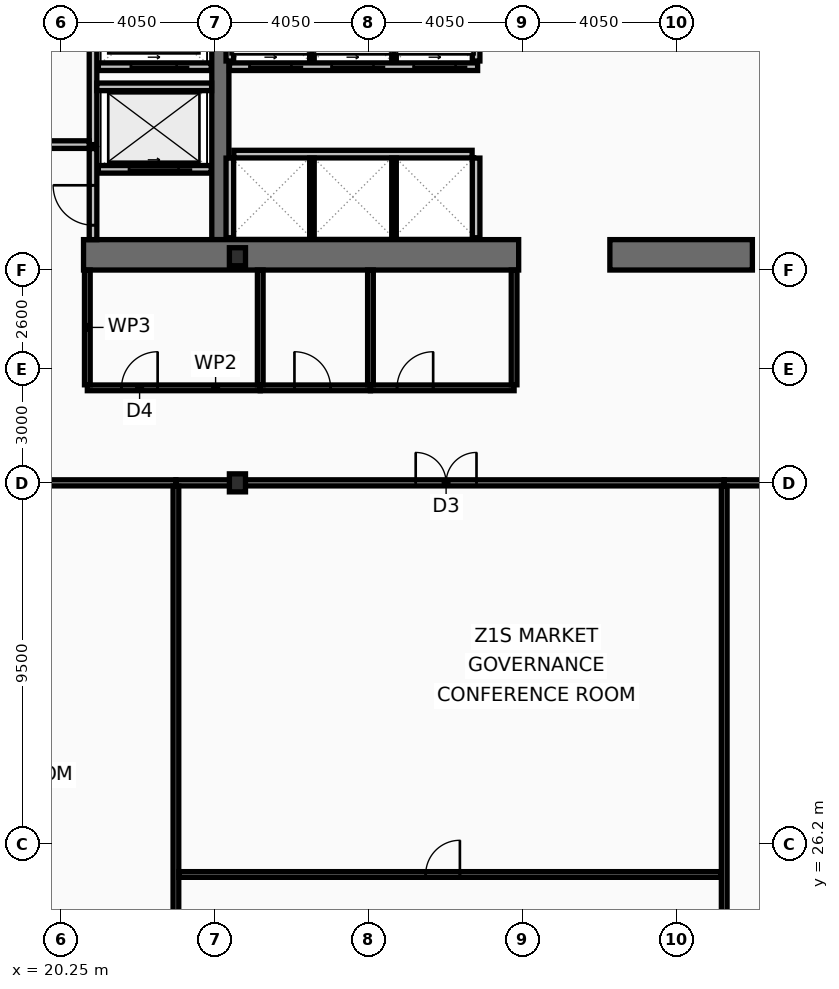
"""IFC4 building model, lengths in metres.
Left out: names, types, materials, properties, quantities, classifications, styles, units other than length and angle.
Written with IfcOpenShell. Run it as: python <this file> out.ifc"""

import sys

from ifc_helpers import new_model, si_unit, direction, frame, frame_2d, origin, origin_2d, place, context, subcontext, project, spatial, rectangle, i_section, extrude, element, fill, save


model = new_model("IFC4")
c1 = context("Model", 3, precision=1e-05, world=origin(), true_north=direction((0.0, 1.0)))
c2 = subcontext(c1, "Body", "Model", "MODEL_VIEW")
j1 = project(units=[si_unit("LENGTHUNIT", "METRE"), si_unit("PLANEANGLEUNIT", "RADIAN")], contexts=[c1])
p1 = place(None, origin())
s1 = spatial("IfcSite", under=j1, at=p1, CompositionType="ELEMENT")
p2 = place(p1, origin())
s2 = spatial("IfcBuilding", under=s1, at=p2, CompositionType="ELEMENT")
p3 = place(p2, frame((0.0, 0.0, 81.8)))
s3 = spatial("IfcBuildingStorey", under=s2, at=p3, CompositionType="ELEMENT", Elevation=81.8)
p4 = place(p3, frame((24.45, 42.1, 0.0), z_axis=(0.0, 0.0, 1.0), x_axis=(0.0, 1.0, 0.0)))
e1 = element("IfcWall", 1, at=p4, inside=s3, PredefinedType="SHEAR", context=c2, shape_type="SweptSolid", body=[
    extrude(rectangle(XDim=10.8, YDim=0.45, at=frame_2d((5.4, 0.0))), origin(), (0.0, 0.0, 1.0), 3.78),
])
p5 = place(p3, frame((32.3, 41.7, 0.0), z_axis=(0.0, 0.0, 1.0), x_axis=(-1.0, 0.0, 0.0)))
e2 = element("IfcWall", 2, at=p5, inside=s3, PredefinedType="SHEAR", context=c2, shape_type="SweptSolid", body=[
    extrude(rectangle(XDim=11.45, YDim=0.8, at=frame_2d((5.725, 0.0))), origin(), (0.0, 0.0, 1.0), 3.78),
])
p6 = place(p3, frame((38.45, 41.7, 0.0), z_axis=(0.0, 0.0, 1.0), x_axis=(-1.0, 0.0, 0.0)))
e3 = element("IfcWall", 3, at=p6, inside=s3, PredefinedType="SHEAR", context=c2, shape_type="SweptSolid", body=[
    extrude(rectangle(XDim=3.75, YDim=0.8, at=frame_2d((1.875, 0.0))), origin(), (0.0, 0.0, 1.0), 3.78),
])
for number, where, z_axis, x_axis in (
    (4, (24.9, 35.7, 0.0), (0.0, 0.0, 1.0), (1.0, 0.0, 0.0)),
    (5, (24.9, 41.65, 0.0), (0.0, 0.0, 1.0), (1.0, 0.0, 0.0)),
):
    element("IfcColumn", number, at=place(p3, frame(where, z_axis=z_axis, x_axis=x_axis)), inside=s3, PredefinedType="COLUMN", context=c2, shape_type="SweptSolid", body=[
        extrude(i_section(OverallWidth=0.424, OverallDepth=0.474, WebThickness=0.048, FlangeThickness=0.077, at=origin_2d()), origin(), (0.0, 0.0, 1.0), 4.0),
    ])
p7 = place(p3, frame((24.21, 43.95, 0.0), z_axis=(0.0, 0.0, 1.0), x_axis=(-1.0, 0.0, 0.0)))
e6 = element("IfcWall", 6, at=p7, inside=s3, PredefinedType="PARTITIONING", context=c2, shape_type="SweptSolid", body=[
    extrude(rectangle(XDim=2.97, YDim=0.2, at=frame_2d((1.485, 0.0))), origin(), (0.0, 0.0, 1.0), 3.78),
])
p8 = place(p7, frame((0.86, 0.0, 0.0)))
e7 = element("IfcOpeningElement", 7, at=p8, cuts=e6, PredefinedType="OPENING", context=c2, shape_type="SweptSolid", body=[
    extrude(rectangle(XDim=1.3, YDim=2.18, at=frame_2d((0.65, 1.09))), frame((0.0, 0.11, 0.0), z_axis=(0.0, -1.0, 0.0), x_axis=(1.0, 0.0, 0.0)), (0.0, 0.0, 1.0), 0.22),
])
p9 = place(p3, frame((24.21, 46.65, 0.0), z_axis=(0.0, 0.0, 1.0), x_axis=(-1.0, 0.0, 0.0)))
e8 = element("IfcWall", 8, at=p9, inside=s3, PredefinedType="PARTITIONING", context=c2, shape_type="SweptSolid", body=[
    extrude(rectangle(XDim=2.97, YDim=0.2, at=frame_2d((1.485, 0.0))), origin(), (0.0, 0.0, 1.0), 3.78),
])
p10 = place(p9, frame((0.91, 0.0, 0.0)))
e9 = element("IfcOpeningElement", 9, at=p10, cuts=e8, PredefinedType="OPENING", context=c2, shape_type="SweptSolid", body=[
    extrude(rectangle(XDim=1.2, YDim=2.18, at=frame_2d((0.6, 1.09))), frame((0.0, 0.11, 0.0), z_axis=(0.0, -1.0, 0.0), x_axis=(1.0, 0.0, 0.0)), (0.0, 0.0, 1.0), 0.22),
])
p11 = place(p3, frame((31.22, 46.65, 0.0), z_axis=(0.0, 0.0, 1.0), x_axis=(-1.0, 0.0, 0.0)))
e10 = element("IfcWall", 10, at=p11, inside=s3, PredefinedType="PARTITIONING", context=c2, shape_type="SweptSolid", body=[
    extrude(rectangle(XDim=6.53, YDim=0.2, at=frame_2d((3.265, 0.0))), origin(), (0.0, 0.0, 1.0), 3.78),
])
p12 = place(p11, frame((4.9, 0.0, 0.0)))
e11 = element("IfcOpeningElement", 11, at=p12, cuts=e10, PredefinedType="OPENING", context=c2, shape_type="SweptSolid", body=[
    extrude(rectangle(XDim=1.1, YDim=2.18, at=frame_2d((0.55, 1.09))), frame((0.0, 0.11, 0.0), z_axis=(0.0, -1.0, 0.0), x_axis=(1.0, 0.0, 0.0)), (0.0, 0.0, 1.0), 0.22),
])
p13 = place(p11, frame((2.74, 0.0, 0.0)))
e12 = element("IfcOpeningElement", 12, at=p13, cuts=e10, PredefinedType="OPENING", context=c2, shape_type="SweptSolid", body=[
    extrude(rectangle(XDim=1.1, YDim=2.18, at=frame_2d((0.55, 1.09))), frame((0.0, 0.11, 0.0), z_axis=(0.0, -1.0, 0.0), x_axis=(1.0, 0.0, 0.0)), (0.0, 0.0, 1.0), 0.22),
])
p14 = place(p11, frame((0.58, 0.0, 0.0)))
e13 = element("IfcOpeningElement", 13, at=p14, cuts=e10, PredefinedType="OPENING", context=c2, shape_type="SweptSolid", body=[
    extrude(rectangle(XDim=1.1, YDim=2.18, at=frame_2d((0.55, 1.09))), frame((0.0, 0.11, 0.0), z_axis=(0.0, -1.0, 0.0), x_axis=(1.0, 0.0, 0.0)), (0.0, 0.0, 1.0), 0.22),
])
p15 = place(p3, frame((21.1, 44.6, 0.0), z_axis=(0.0, 0.0, 1.0), x_axis=(0.0, 1.0, 0.0)))
e14 = element("IfcWall", 14, at=p15, inside=s3, PredefinedType="PARTITIONING", context=c2, shape_type="SweptSolid", body=[
    extrude(rectangle(XDim=4.3, YDim=0.2, at=frame_2d((2.15, 0.0))), origin(), (0.0, 0.0, 1.0), 3.78),
])
p16 = place(p3, frame((17.0, 44.6, 0.0), z_axis=(0.0, 0.0, 1.0), x_axis=(1.0, 0.0, 0.0)))
e15 = element("IfcWall", 15, at=p16, inside=s3, PredefinedType="PARTITIONING", context=c2, shape_type="SweptSolid", body=[
    extrude(rectangle(XDim=4.0, YDim=0.2, at=frame_2d((2.0, 0.0))), origin(), (0.0, 0.0, 1.0), 3.78),
])
p17 = place(p16, frame((1.25, 0.0, 0.0)))
e16 = element("IfcOpeningElement", 16, at=p17, cuts=e15, PredefinedType="OPENING", context=c2, shape_type="SweptSolid", body=[
    extrude(rectangle(XDim=1.05, YDim=2.15, at=frame_2d((0.525, 1.075))), frame((0.0, 0.11, 0.0), z_axis=(0.0, -1.0, 0.0), x_axis=(1.0, 0.0, 0.0)), (0.0, 0.0, 1.0), 0.22),
])
p18 = place(p3, frame((21.2, 46.12, 0.0), z_axis=(0.0, 0.0, 1.0), x_axis=(1.0, 0.0, 0.0)))
e17 = element("IfcWall", 17, at=p18, inside=s3, PredefinedType="PARTITIONING", context=c2, shape_type="SweptSolid", body=[
    extrude(rectangle(XDim=3.02, YDim=0.2, at=frame_2d((1.51, 0.0))), origin(), (0.0, 0.0, 1.0), 3.78),
])
p19 = place(p3, frame((21.1, 42.1, 0.0), z_axis=(0.0, 0.0, 1.0), x_axis=(0.0, 1.0, 0.0)))
e18 = element("IfcWall", 18, at=p19, inside=s3, PredefinedType="PARTITIONING", context=c2, shape_type="SweptSolid", body=[
    extrude(rectangle(XDim=2.395, YDim=0.2, at=frame_2d((1.198, 0.0))), origin(), (0.0, 0.0, 1.0), 3.78),
])
p20 = place(p19, frame((0.38, 0.0, 0.0)))
e19 = element("IfcOpeningElement", 19, at=p20, cuts=e18, PredefinedType="OPENING", context=c2, shape_type="SweptSolid", body=[
    extrude(rectangle(XDim=1.05, YDim=2.15, at=frame_2d((0.525, 1.075))), frame((0.0, 0.11, 0.0), z_axis=(0.0, -1.0, 0.0), x_axis=(1.0, 0.0, 0.0)), (0.0, 0.0, 1.0), 0.22),
])
for number, where, z_axis, x_axis in (
    (20, (24.7, 46.8, 0.0), (0.0, 0.0, 1.0), (0.0, 1.0, 0.0)),
    (21, (31.18, 46.8, 0.0), (0.0, 0.0, 1.0), (0.0, 1.0, 0.0)),
):
    element("IfcWall", number, at=place(p3, frame(where, z_axis=z_axis, x_axis=x_axis)), inside=s3, PredefinedType="PARTITIONING", context=c2, shape_type="SweptSolid", body=[
        extrude(rectangle(XDim=2.095, YDim=0.2, at=frame_2d((1.047, 0.0))), origin(), (0.0, 0.0, 1.0), 3.78),
    ])
for number, where, z_axis, x_axis in (
    (22, (26.86, 46.8, 0.0), (0.0, 0.0, 1.0), (0.0, 1.0, 0.0)),
    (23, (29.02, 46.8, 0.0), (0.0, 0.0, 1.0), (0.0, 1.0, 0.0)),
):
    element("IfcWall", number, at=place(p3, frame(where, z_axis=z_axis, x_axis=x_axis)), inside=s3, PredefinedType="PARTITIONING", context=c2, shape_type="SweptSolid", body=[
        extrude(rectangle(XDim=2.095, YDim=0.12, at=frame_2d((1.047, 0.0))), origin(), (0.0, 0.0, 1.0), 3.78),
    ])
p21 = place(p3, frame((24.805, 44.35, 0.0), z_axis=(0.0, 0.0, 1.0), x_axis=(1.0, 0.0, 0.0)))
e24 = element("IfcWall", 24, at=p21, inside=s3, PredefinedType="PARTITIONING", context=c2, shape_type="SweptSolid", body=[
    extrude(rectangle(XDim=6.27, YDim=0.2, at=frame_2d((3.135, 0.0))), origin(), (0.0, 0.0, 1.0), 3.78),
])
for number, where, z_axis, x_axis in (
    (25, (24.7, 42.15, 0.0), (0.0, 0.0, 1.0), (0.0, 1.0, 0.0)),
    (26, (31.18, 42.15, 0.0), (0.0, 0.0, 1.0), (0.0, 1.0, 0.0)),
):
    element("IfcWall", number, at=place(p3, frame(where, z_axis=z_axis, x_axis=x_axis)), inside=s3, PredefinedType="PARTITIONING", context=c2, shape_type="SweptSolid", body=[
        extrude(rectangle(XDim=2.095, YDim=0.2, at=frame_2d((1.048, 0.0))), origin(), (0.0, 0.0, 1.0), 3.78),
    ])
for number, where, z_axis, x_axis in (
    (27, (26.86, 42.15, 0.0), (0.0, 0.0, 1.0), (0.0, 1.0, 0.0)),
    (28, (29.02, 42.15, 0.0), (0.0, 0.0, 1.0), (0.0, 1.0, 0.0)),
):
    element("IfcWall", number, at=place(p3, frame(where, z_axis=z_axis, x_axis=x_axis)), inside=s3, PredefinedType="PARTITIONING", context=c2, shape_type="SweptSolid", body=[
        extrude(rectangle(XDim=2.095, YDim=0.12, at=frame_2d((1.048, 0.0))), origin(), (0.0, 0.0, 1.0), 3.78),
    ])
p22 = place(p3, frame((20.95, 38.2, 0.0), z_axis=(0.0, 0.0, 1.0), x_axis=(1.0, 0.0, 0.0)))
e29 = element("IfcWall", 29, at=p22, inside=s3, PredefinedType="PARTITIONING", context=c2, shape_type="SweptSolid", body=[
    extrude(rectangle(XDim=4.55, YDim=0.15, at=frame_2d((2.275, 0.0))), origin(), (0.0, 0.0, 1.0), 2.97),
])
p23 = place(p22, frame((0.9, 0.0, 0.0)))
e30 = element("IfcOpeningElement", 30, at=p23, cuts=e29, PredefinedType="OPENING", context=c2, shape_type="SweptSolid", body=[
    extrude(rectangle(XDim=0.95, YDim=2.05, at=frame_2d((0.475, 1.025))), frame((0.0, 0.085, 0.0), z_axis=(0.0, -1.0, 0.0), x_axis=(1.0, 0.0, 0.0)), (0.0, 0.0, 1.0), 0.17),
])
p24 = place(p3, frame((25.5, 38.2, 0.0), z_axis=(0.0, 0.0, 1.0), x_axis=(1.0, 0.0, 0.0)))
e31 = element("IfcWall", 31, at=p24, inside=s3, PredefinedType="PARTITIONING", context=c2, shape_type="SweptSolid", body=[
    extrude(rectangle(XDim=2.9, YDim=0.15, at=frame_2d((1.45, 0.0))), origin(), (0.0, 0.0, 1.0), 3.78),
])
p25 = place(p24, frame((0.9, 0.0, 0.0)))
e32 = element("IfcOpeningElement", 32, at=p25, cuts=e31, PredefinedType="OPENING", context=c2, shape_type="SweptSolid", body=[
    extrude(rectangle(XDim=0.95, YDim=2.05, at=frame_2d((0.475, 1.025))), frame((0.0, 0.085, 0.0), z_axis=(0.0, -1.0, 0.0), x_axis=(1.0, 0.0, 0.0)), (0.0, 0.0, 1.0), 0.17),
])
p26 = place(p3, frame((28.4, 38.2, 0.0), z_axis=(0.0, 0.0, 1.0), x_axis=(1.0, 0.0, 0.0)))
e33 = element("IfcWall", 33, at=p26, inside=s3, PredefinedType="PARTITIONING", context=c2, shape_type="SweptSolid", body=[
    extrude(rectangle(XDim=3.78, YDim=0.15, at=frame_2d((1.89, 0.0))), origin(), (0.0, 0.0, 1.0), 2.97),
])
p27 = place(p26, frame((0.7, 0.0, 0.0)))
e34 = element("IfcOpeningElement", 34, at=p27, cuts=e33, PredefinedType="OPENING", context=c2, shape_type="SweptSolid", body=[
    extrude(rectangle(XDim=0.95, YDim=2.05, at=frame_2d((0.475, 1.025))), frame((0.0, 0.085, 0.0), z_axis=(0.0, -1.0, 0.0), x_axis=(1.0, 0.0, 0.0)), (0.0, 0.0, 1.0), 0.17),
])
for number, where, z_axis, x_axis in (
    (35, (20.95, 38.28, 0.0), (0.0, 0.0, 1.0), (0.0, 1.0, 0.0)),
    (36, (25.5, 38.28, 0.0), (0.0, 0.0, 1.0), (0.0, 1.0, 0.0)),
    (37, (28.4, 38.28, 0.0), (0.0, 0.0, 1.0), (0.0, 1.0, 0.0)),
    (38, (32.18, 38.28, 0.0), (0.0, 0.0, 1.0), (0.0, 1.0, 0.0)),
):
    element("IfcWall", number, at=place(p3, frame(where, z_axis=z_axis, x_axis=x_axis)), inside=s3, PredefinedType="PARTITIONING", context=c2, shape_type="SweptSolid", body=[
        extrude(rectangle(XDim=3.02, YDim=0.15, at=frame_2d((1.51, 0.0))), origin(), (0.0, 0.0, 1.0), 3.78),
    ])
p28 = place(p3, frame((12.623, 35.7, 0.0), z_axis=(0.0, 0.0, 1.0), x_axis=(1.0, 0.0, 0.0)))
e39 = element("IfcWall", 39, at=p28, inside=s3, PredefinedType="PARTITIONING", context=c2, shape_type="SweptSolid", body=[
    extrude(rectangle(XDim=10.658, YDim=0.16, at=frame_2d((5.329, 0.0))), origin(), (0.0, 0.0, 1.0), 2.97),
])
p29 = place(p28, frame((3.926, 0.0, 0.0)))
e40 = element("IfcOpeningElement", 40, at=p29, cuts=e39, PredefinedType="OPENING", context=c2, shape_type="SweptSolid", body=[
    extrude(rectangle(XDim=1.0, YDim=2.05, at=frame_2d((0.5, 1.025))), frame((0.0, 0.09, 0.0), z_axis=(0.0, -1.0, 0.0), x_axis=(1.0, 0.0, 0.0)), (0.0, 0.0, 1.0), 0.18),
])
p30 = place(p3, frame((23.281, 35.7, 0.0), z_axis=(0.0, 0.0, 1.0), x_axis=(1.0, 0.0, 0.0)))
e41 = element("IfcWall", 41, at=p30, inside=s3, PredefinedType="PARTITIONING", context=c2, shape_type="SweptSolid", body=[
    extrude(rectangle(XDim=14.428, YDim=0.16, at=frame_2d((7.214, 0.0))), origin(), (0.0, 0.0, 1.0), 2.97),
])
p31 = place(p30, frame((6.31, 0.0, 0.0)))
e42 = element("IfcOpeningElement", 42, at=p31, cuts=e41, PredefinedType="OPENING", context=c2, shape_type="SweptSolid", body=[
    extrude(rectangle(XDim=1.6, YDim=2.15, at=frame_2d((0.8, 1.075))), frame((0.0, 0.09, 0.0), z_axis=(0.0, -1.0, 0.0), x_axis=(1.0, 0.0, 0.0)), (0.0, 0.0, 1.0), 0.18),
])
p32 = place(p3, frame((23.281, 10.665, 0.0), z_axis=(0.0, 0.0, 1.0), x_axis=(0.0, 1.0, 0.0)))
e43 = element("IfcWall", 43, at=p32, inside=s3, PredefinedType="PARTITIONING", context=c2, shape_type="SweptSolid", body=[
    extrude(rectangle(XDim=24.95, YDim=0.15, at=frame_2d((12.475, 0.0))), origin(), (0.0, 0.0, 1.0), 3.22),
])
p33 = place(p3, frame((23.361, 25.395, 0.0), z_axis=(0.0, 0.0, 1.0), x_axis=(1.0, 0.0, 0.0)))
e44 = element("IfcWall", 44, at=p33, inside=s3, PredefinedType="PARTITIONING", context=c2, shape_type="SweptSolid", body=[
    extrude(rectangle(XDim=14.268, YDim=0.15, at=frame_2d((7.134, 0.0))), origin(), (0.0, 0.0, 1.0), 2.97),
])
p34 = place(p33, frame((6.493, 0.0, 0.0)))
e45 = element("IfcOpeningElement", 45, at=p34, cuts=e44, PredefinedType="OPENING", context=c2, shape_type="SweptSolid", body=[
    extrude(rectangle(XDim=0.9, YDim=2.05, at=frame_2d((0.45, 1.025))), frame((0.0, 0.085, 0.0), z_axis=(0.0, -1.0, 0.0), x_axis=(1.0, 0.0, 0.0)), (0.0, 0.0, 1.0), 0.17),
])
p35 = place(p3, frame((37.709, 35.7, 0.0), z_axis=(0.0, 0.0, 1.0), x_axis=(1.0, 0.0, 0.0)))
e46 = element("IfcWall", 46, at=p35, inside=s3, PredefinedType="PARTITIONING", context=c2, shape_type="SweptSolid", body=[
    extrude(rectangle(XDim=12.789, YDim=0.16, at=frame_2d((6.395, 0.0))), origin(), (0.0, 0.0, 1.0), 2.97),
])
p36 = place(p35, frame((5.622, 0.0, 0.0)))
e47 = element("IfcOpeningElement", 47, at=p36, cuts=e46, PredefinedType="OPENING", context=c2, shape_type="SweptSolid", body=[
    extrude(rectangle(XDim=1.0, YDim=2.05, at=frame_2d((0.5, 1.025))), frame((0.0, 0.09, 0.0), z_axis=(0.0, -1.0, 0.0), x_axis=(1.0, 0.0, 0.0)), (0.0, 0.0, 1.0), 0.18),
])
p37 = place(p3, frame((37.709, 10.665, 0.0), z_axis=(0.0, 0.0, 1.0), x_axis=(0.0, 1.0, 0.0)))
e48 = element("IfcWall", 48, at=p37, inside=s3, PredefinedType="PARTITIONING", context=c2, shape_type="SweptSolid", body=[
    extrude(rectangle(XDim=24.95, YDim=0.15, at=frame_2d((12.475, 0.0))), origin(), (0.0, 0.0, 1.0), 3.22),
])
p38 = place(p8, origin())
e49 = element("IfcDoor", 49, at=p38, inside=s3, OperationType="SLIDING_TO_LEFT", PredefinedType="DOOR", context=c2, shape_type="SweptSolid", body=[
    extrude(rectangle(XDim=1.3, YDim=2.18, at=frame_2d((0.65, 1.09))), frame((0.0, 0.025, 0.0), z_axis=(0.0, -1.0, 0.0), x_axis=(1.0, 0.0, 0.0)), (0.0, 0.0, 1.0), 0.05),
])
fill(e7, e49)
p39 = place(p10, origin())
e50 = element("IfcDoor", 50, at=p39, inside=s3, OperationType="SLIDING_TO_LEFT", PredefinedType="DOOR", context=c2, shape_type="SweptSolid", body=[
    extrude(rectangle(XDim=1.2, YDim=2.18, at=frame_2d((0.6, 1.09))), frame((0.0, 0.025, 0.0), z_axis=(0.0, -1.0, 0.0), x_axis=(1.0, 0.0, 0.0)), (0.0, 0.0, 1.0), 0.05),
])
fill(e9, e50)
p40 = place(p12, origin())
e51 = element("IfcDoor", 51, at=p40, inside=s3, OperationType="SLIDING_TO_LEFT", PredefinedType="DOOR", context=c2, shape_type="SweptSolid", body=[
    extrude(rectangle(XDim=1.1, YDim=2.18, at=frame_2d((0.55, 1.09))), frame((0.0, 0.025, 0.0), z_axis=(0.0, -1.0, 0.0), x_axis=(1.0, 0.0, 0.0)), (0.0, 0.0, 1.0), 0.05),
])
fill(e11, e51)
p41 = place(p13, origin())
e52 = element("IfcDoor", 52, at=p41, inside=s3, OperationType="SLIDING_TO_LEFT", PredefinedType="DOOR", context=c2, shape_type="SweptSolid", body=[
    extrude(rectangle(XDim=1.1, YDim=2.18, at=frame_2d((0.55, 1.09))), frame((0.0, 0.025, 0.0), z_axis=(0.0, -1.0, 0.0), x_axis=(1.0, 0.0, 0.0)), (0.0, 0.0, 1.0), 0.05),
])
fill(e12, e52)
p42 = place(p14, origin())
e53 = element("IfcDoor", 53, at=p42, inside=s3, OperationType="SLIDING_TO_LEFT", PredefinedType="DOOR", context=c2, shape_type="SweptSolid", body=[
    extrude(rectangle(XDim=1.1, YDim=2.18, at=frame_2d((0.55, 1.09))), frame((0.0, 0.025, 0.0), z_axis=(0.0, -1.0, 0.0), x_axis=(1.0, 0.0, 0.0)), (0.0, 0.0, 1.0), 0.05),
])
fill(e13, e53)
p43 = place(p20, origin())
e54 = element("IfcDoor", 54, at=p43, inside=s3, OperationType="SINGLE_SWING_RIGHT", PredefinedType="DOOR", context=c2, shape_type="SweptSolid", body=[
    extrude(rectangle(XDim=1.05, YDim=2.15, at=frame_2d((0.525, 1.075))), frame((0.0, 0.025, 0.0), z_axis=(0.0, -1.0, 0.0), x_axis=(1.0, 0.0, 0.0)), (0.0, 0.0, 1.0), 0.05),
])
fill(e19, e54)
p44 = place(p23, origin())
e55 = element("IfcDoor", 55, at=p44, inside=s3, OperationType="SINGLE_SWING_RIGHT", PredefinedType="DOOR", context=c2, shape_type="SweptSolid", body=[
    extrude(rectangle(XDim=0.95, YDim=2.05, at=frame_2d((0.475, 1.025))), frame((0.0, 0.025, 0.0), z_axis=(0.0, -1.0, 0.0), x_axis=(1.0, 0.0, 0.0)), (0.0, 0.0, 1.0), 0.05),
])
fill(e30, e55)
p45 = place(p25, origin())
e56 = element("IfcDoor", 56, at=p45, inside=s3, OperationType="SINGLE_SWING_LEFT", PredefinedType="DOOR", context=c2, shape_type="SweptSolid", body=[
    extrude(rectangle(XDim=0.95, YDim=2.05, at=frame_2d((0.475, 1.025))), frame((0.0, 0.025, 0.0), z_axis=(0.0, -1.0, 0.0), x_axis=(1.0, 0.0, 0.0)), (0.0, 0.0, 1.0), 0.05),
])
fill(e32, e56)
p46 = place(p27, origin())
e57 = element("IfcDoor", 57, at=p46, inside=s3, OperationType="SINGLE_SWING_RIGHT", PredefinedType="DOOR", context=c2, shape_type="SweptSolid", body=[
    extrude(rectangle(XDim=0.95, YDim=2.05, at=frame_2d((0.475, 1.025))), frame((0.0, 0.025, 0.0), z_axis=(0.0, -1.0, 0.0), x_axis=(1.0, 0.0, 0.0)), (0.0, 0.0, 1.0), 0.05),
])
fill(e34, e57)
p47 = place(p31, origin())
e58 = element("IfcDoor", 58, at=p47, inside=s3, OperationType="DOUBLE_DOOR_SINGLE_SWING", PredefinedType="DOOR", context=c2, shape_type="SweptSolid", body=[
    extrude(rectangle(XDim=1.6, YDim=2.15, at=frame_2d((0.8, 1.075))), frame((0.0, 0.025, 0.0), z_axis=(0.0, -1.0, 0.0), x_axis=(1.0, 0.0, 0.0)), (0.0, 0.0, 1.0), 0.05),
])
fill(e42, e58)
p48 = place(p34, origin())
e59 = element("IfcDoor", 59, at=p48, inside=s3, OperationType="SINGLE_SWING_RIGHT", PredefinedType="DOOR", context=c2, shape_type="SweptSolid", body=[
    extrude(rectangle(XDim=0.9, YDim=2.05, at=frame_2d((0.45, 1.025))), frame((0.0, 0.025, 0.0), z_axis=(0.0, -1.0, 0.0), x_axis=(1.0, 0.0, 0.0)), (0.0, 0.0, 1.0), 0.05),
])
fill(e45, e59)
save(model, sys.argv[1])
